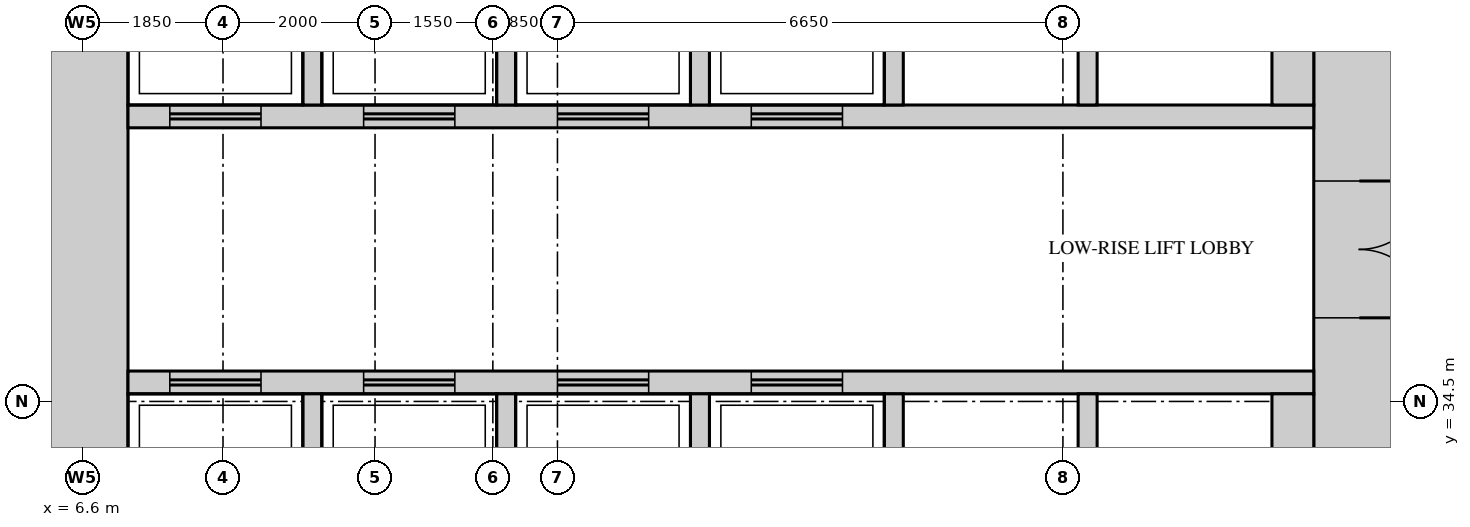
"""IFC4 building model, lengths in metres.
Left out: names, types, materials, properties, quantities, classifications, styles, units other than length and angle.
Written with IfcOpenShell. Run it as: python <this file> out.ifc"""

import sys

from ifc_helpers import new_model, si_unit, direction, frame, frame_2d, origin, place, context, subcontext, project, spatial, rectangle, extrude, source, transform, mapped, element, fill, save


model = new_model("IFC4")
c1 = context("Model", 3, precision=1e-05, world=origin(), true_north=direction((0.0, 1.0)))
c2 = subcontext(c1, "Body", "Model", "MODEL_VIEW")
j1 = project(units=[si_unit("LENGTHUNIT", "METRE"), si_unit("PLANEANGLEUNIT", "RADIAN")], contexts=[c1])
p1 = place(None, origin())
s1 = spatial("IfcSite", under=j1, at=p1, CompositionType="ELEMENT")
p2 = place(p1, origin())
s2 = spatial("IfcBuilding", under=s1, at=p2, CompositionType="ELEMENT")
p3 = place(p2, frame((0.0, 0.0, 69.0)))
s3 = spatial("IfcBuildingStorey", under=s2, at=p3, CompositionType="ELEMENT", Elevation=69.0)
m1 = source(origin(), c2, "Body", "SweptSolid", [
    extrude(rectangle(XDim=27.6, YDim=1.2, at=frame_2d((13.8, 0.0))), origin(), (0.0, 0.0, 1.0), 4.2),
])
p4 = place(p3, frame((23.4, 13.2, 0.0), z_axis=(0.0, 0.0, 1.0), x_axis=(0.0, 1.0, 0.0)))
e1 = element("IfcWall", 1, at=p4, inside=s3, PredefinedType="SHEAR", context=c2, shape_type="MappedRepresentation", body=[
    mapped(m1, transform((0.0, 0.0, 0.0))),
])
m2 = source(origin(), c2, "Body", "SweptSolid", [
    extrude(rectangle(XDim=1.8, YDim=2.1, at=frame_2d((0.9, 1.05))), frame((0.0, 0.61, 0.0), z_axis=(0.0, -1.0, 0.0), x_axis=(1.0, 0.0, 0.0)), (0.0, 0.0, 1.0), 1.22),
])
p5 = place(p4, frame((22.4, 0.0, 0.0)))
e2 = element("IfcOpeningElement", 2, at=p5, cuts=e1, PredefinedType="OPENING", context=c2, shape_type="MappedRepresentation", body=[
    mapped(m2, transform((0.0, 0.0, 0.0))),
])
m3 = source(origin(), c2, "Body", "SweptSolid", [
    extrude(rectangle(XDim=1.2, YDim=2.1, at=frame_2d((0.6, 1.05))), frame((0.0, 0.61, 0.0), z_axis=(0.0, -1.0, 0.0), x_axis=(1.0, 0.0, 0.0)), (0.0, 0.0, 1.0), 1.22),
])
p6 = place(p4, frame((12.15, 0.0, 0.0)))
e3 = element("IfcOpeningElement", 3, at=p6, cuts=e1, PredefinedType="OPENING", context=c2, shape_type="MappedRepresentation", body=[
    mapped(m3, transform((0.0, 0.0, 0.0))),
])
m4 = source(origin(), c2, "Body", "SweptSolid", [
    extrude(rectangle(XDim=0.9, YDim=2.1, at=frame_2d((0.45, 1.05))), frame((0.0, 0.61, 0.0), z_axis=(0.0, -1.0, 0.0), x_axis=(1.0, 0.0, 0.0)), (0.0, 0.0, 1.0), 1.22),
])
p7 = place(p4, frame((4.4, 0.0, 0.0)))
e4 = element("IfcOpeningElement", 4, at=p7, cuts=e1, PredefinedType="OPENING", context=c2, shape_type="MappedRepresentation", body=[
    mapped(m4, transform((0.0, 0.0, 0.0))),
])
p8 = place(p3, frame((6.6, 13.2, 0.0), z_axis=(0.0, 0.0, 1.0), x_axis=(0.0, 1.0, 0.0)))
e5 = element("IfcWall", 5, at=p8, inside=s3, PredefinedType="SHEAR", context=c2, shape_type="MappedRepresentation", body=[
    mapped(m1, transform((0.0, 0.0, 0.0))),
])
m5 = source(origin(), c2, "Body", "SweptSolid", [
    extrude(rectangle(XDim=15.6, YDim=0.3, at=frame_2d((7.8, 0.0))), origin(), (0.0, 0.0, 1.0), 4.2),
])
p9 = place(p3, frame((7.2, 38.25, 0.0), z_axis=(0.0, 0.0, 1.0), x_axis=(1.0, 0.0, 0.0)))
e6 = element("IfcWall", 6, at=p9, inside=s3, PredefinedType="STANDARD", context=c2, shape_type="MappedRepresentation", body=[
    mapped(m5, transform((0.0, 0.0, 0.0))),
])
m6 = source(origin(), c2, "Body", "SweptSolid", [
    extrude(rectangle(XDim=1.2, YDim=2.1, at=frame_2d((0.6, 1.05))), frame((0.0, 0.16, 0.0), z_axis=(0.0, -1.0, 0.0), x_axis=(1.0, 0.0, 0.0)), (0.0, 0.0, 1.0), 0.32),
])
p10 = place(p9, frame((0.55, 0.0, 0.0)))
e7 = element("IfcOpeningElement", 7, at=p10, cuts=e6, PredefinedType="OPENING", context=c2, shape_type="MappedRepresentation", body=[
    mapped(m6, transform((0.0, 0.0, 0.0))),
])
p11 = place(p9, frame((3.1, 0.0, 0.0)))
e8 = element("IfcOpeningElement", 8, at=p11, cuts=e6, PredefinedType="OPENING", context=c2, shape_type="MappedRepresentation", body=[
    mapped(m6, transform((0.0, 0.0, 0.0))),
])
p12 = place(p9, frame((5.65, 0.0, 0.0)))
e9 = element("IfcOpeningElement", 9, at=p12, cuts=e6, PredefinedType="OPENING", context=c2, shape_type="MappedRepresentation", body=[
    mapped(m6, transform((0.0, 0.0, 0.0))),
])
p13 = place(p9, frame((8.2, 0.0, 0.0)))
e10 = element("IfcOpeningElement", 10, at=p13, cuts=e6, PredefinedType="OPENING", context=c2, shape_type="MappedRepresentation", body=[
    mapped(m6, transform((0.0, 0.0, 0.0))),
])
p14 = place(p3, frame((7.2, 34.75, 0.0), z_axis=(0.0, 0.0, 1.0), x_axis=(1.0, 0.0, 0.0)))
e11 = element("IfcWall", 11, at=p14, inside=s3, PredefinedType="STANDARD", context=c2, shape_type="MappedRepresentation", body=[
    mapped(m5, transform((0.0, 0.0, 0.0))),
])
p15 = place(p14, frame((0.55, 0.0, 0.0)))
e12 = element("IfcOpeningElement", 12, at=p15, cuts=e11, PredefinedType="OPENING", context=c2, shape_type="MappedRepresentation", body=[
    mapped(m6, transform((0.0, 0.0, 0.0))),
])
p16 = place(p14, frame((3.1, 0.0, 0.0)))
e13 = element("IfcOpeningElement", 13, at=p16, cuts=e11, PredefinedType="OPENING", context=c2, shape_type="MappedRepresentation", body=[
    mapped(m6, transform((0.0, 0.0, 0.0))),
])
p17 = place(p14, frame((5.65, 0.0, 0.0)))
e14 = element("IfcOpeningElement", 14, at=p17, cuts=e11, PredefinedType="OPENING", context=c2, shape_type="MappedRepresentation", body=[
    mapped(m6, transform((0.0, 0.0, 0.0))),
])
p18 = place(p14, frame((8.2, 0.0, 0.0)))
e15 = element("IfcOpeningElement", 15, at=p18, cuts=e11, PredefinedType="OPENING", context=c2, shape_type="MappedRepresentation", body=[
    mapped(m6, transform((0.0, 0.0, 0.0))),
])
m7 = source(origin(), c2, "Body", "SweptSolid", [
    extrude(rectangle(XDim=2.4, YDim=0.25, at=frame_2d((1.2, 0.0))), origin(), (0.0, 0.0, 1.0), 4.2),
])
for number, where, z_axis, x_axis in (
    (16, (9.625, 38.4, 0.0), (0.0, 0.0, 1.0), (0.0, 1.0, 0.0)),
    (17, (12.175, 38.4, 0.0), (0.0, 0.0, 1.0), (0.0, 1.0, 0.0)),
    (18, (14.725, 38.4, 0.0), (0.0, 0.0, 1.0), (0.0, 1.0, 0.0)),
    (19, (17.275, 38.4, 0.0), (0.0, 0.0, 1.0), (0.0, 1.0, 0.0)),
    (20, (19.825, 38.4, 0.0), (0.0, 0.0, 1.0), (0.0, 1.0, 0.0)),
):
    element("IfcWall", number, at=place(p3, frame(where, z_axis=z_axis, x_axis=x_axis)), inside=s3, PredefinedType="STANDARD", context=c2, shape_type="MappedRepresentation", body=[
        mapped(m7, transform((0.0, 0.0, 0.0))),
    ])
m8 = source(origin(), c2, "Body", "SweptSolid", [
    extrude(rectangle(XDim=2.4, YDim=0.55, at=frame_2d((1.2, 0.0))), origin(), (0.0, 0.0, 1.0), 4.2),
])
p19 = place(p3, frame((22.525, 38.4, 0.0), z_axis=(0.0, 0.0, 1.0), x_axis=(0.0, 1.0, 0.0)))
e21 = element("IfcWall", 21, at=p19, inside=s3, PredefinedType="STANDARD", context=c2, shape_type="MappedRepresentation", body=[
    mapped(m8, transform((0.0, 0.0, 0.0))),
])
for number, where, z_axis, x_axis in (
    (22, (9.625, 32.2, 0.0), (0.0, 0.0, 1.0), (0.0, 1.0, 0.0)),
    (23, (12.175, 32.2, 0.0), (0.0, 0.0, 1.0), (0.0, 1.0, 0.0)),
    (24, (14.725, 32.2, 0.0), (0.0, 0.0, 1.0), (0.0, 1.0, 0.0)),
    (25, (17.275, 32.2, 0.0), (0.0, 0.0, 1.0), (0.0, 1.0, 0.0)),
    (26, (19.825, 32.2, 0.0), (0.0, 0.0, 1.0), (0.0, 1.0, 0.0)),
):
    element("IfcWall", number, at=place(p3, frame(where, z_axis=z_axis, x_axis=x_axis)), inside=s3, PredefinedType="STANDARD", context=c2, shape_type="MappedRepresentation", body=[
        mapped(m7, transform((0.0, 0.0, 0.0))),
    ])
p20 = place(p3, frame((22.525, 32.2, 0.0), z_axis=(0.0, 0.0, 1.0), x_axis=(0.0, 1.0, 0.0)))
e27 = element("IfcWall", 27, at=p20, inside=s3, PredefinedType="STANDARD", context=c2, shape_type="MappedRepresentation", body=[
    mapped(m8, transform((0.0, 0.0, 0.0))),
])
m9 = source(origin(), c2, "Body", "SweptSolid", [
    extrude(rectangle(XDim=1.8, YDim=2.1, at=frame_2d((0.9, 1.05))), frame((0.0, 0.55, 0.0), z_axis=(0.0, -1.0, 0.0), x_axis=(1.0, 0.0, 0.0)), (0.0, 0.0, 1.0), 1.1),
])
p21 = place(p5, origin())
e28 = element("IfcDoor", 28, at=p21, inside=s3, OperationType="DOUBLE_DOOR_SINGLE_SWING", PredefinedType="DOOR", context=c2, shape_type="MappedRepresentation", body=[
    mapped(m9, transform((0.0, 0.0, 0.0))),
])
fill(e2, e28)
m10 = source(origin(), c2, "Body", "SweptSolid", [
    extrude(rectangle(XDim=1.2, YDim=2.1, at=frame_2d((0.6, 1.05))), frame((0.0, 0.025, 0.0), z_axis=(0.0, -1.0, 0.0), x_axis=(1.0, 0.0, 0.0)), (0.0, 0.0, 1.0), 0.05),
])
p22 = place(p15, origin())
e29 = element("IfcDoor", 29, at=p22, inside=s3, OperationType="DOUBLE_DOOR_SLIDING", PredefinedType="DOOR", context=c2, shape_type="MappedRepresentation", body=[
    mapped(m10, transform((0.0, 0.0, 0.0))),
])
fill(e12, e29)
p23 = place(p16, origin())
e30 = element("IfcDoor", 30, at=p23, inside=s3, OperationType="DOUBLE_DOOR_SLIDING", PredefinedType="DOOR", context=c2, shape_type="MappedRepresentation", body=[
    mapped(m10, transform((0.0, 0.0, 0.0))),
])
fill(e13, e30)
p24 = place(p17, origin())
e31 = element("IfcDoor", 31, at=p24, inside=s3, OperationType="DOUBLE_DOOR_SLIDING", PredefinedType="DOOR", context=c2, shape_type="MappedRepresentation", body=[
    mapped(m10, transform((0.0, 0.0, 0.0))),
])
fill(e14, e31)
p25 = place(p18, origin())
e32 = element("IfcDoor", 32, at=p25, inside=s3, OperationType="DOUBLE_DOOR_SLIDING", PredefinedType="DOOR", context=c2, shape_type="MappedRepresentation", body=[
    mapped(m10, transform((0.0, 0.0, 0.0))),
])
fill(e15, e32)
p26 = place(p10, origin())
e33 = element("IfcDoor", 33, at=p26, inside=s3, OperationType="DOUBLE_DOOR_SLIDING", PredefinedType="DOOR", context=c2, shape_type="MappedRepresentation", body=[
    mapped(m10, transform((0.0, 0.0, 0.0))),
])
fill(e7, e33)
p27 = place(p11, origin())
e34 = element("IfcDoor", 34, at=p27, inside=s3, OperationType="DOUBLE_DOOR_SLIDING", PredefinedType="DOOR", context=c2, shape_type="MappedRepresentation", body=[
    mapped(m10, transform((0.0, 0.0, 0.0))),
])
fill(e8, e34)
p28 = place(p12, origin())
e35 = element("IfcDoor", 35, at=p28, inside=s3, OperationType="DOUBLE_DOOR_SLIDING", PredefinedType="DOOR", context=c2, shape_type="MappedRepresentation", body=[
    mapped(m10, transform((0.0, 0.0, 0.0))),
])
fill(e9, e35)
p29 = place(p13, origin())
e36 = element("IfcDoor", 36, at=p29, inside=s3, OperationType="DOUBLE_DOOR_SLIDING", PredefinedType="DOOR", context=c2, shape_type="MappedRepresentation", body=[
    mapped(m10, transform((0.0, 0.0, 0.0))),
])
fill(e10, e36)
save(model, sys.argv[1])
